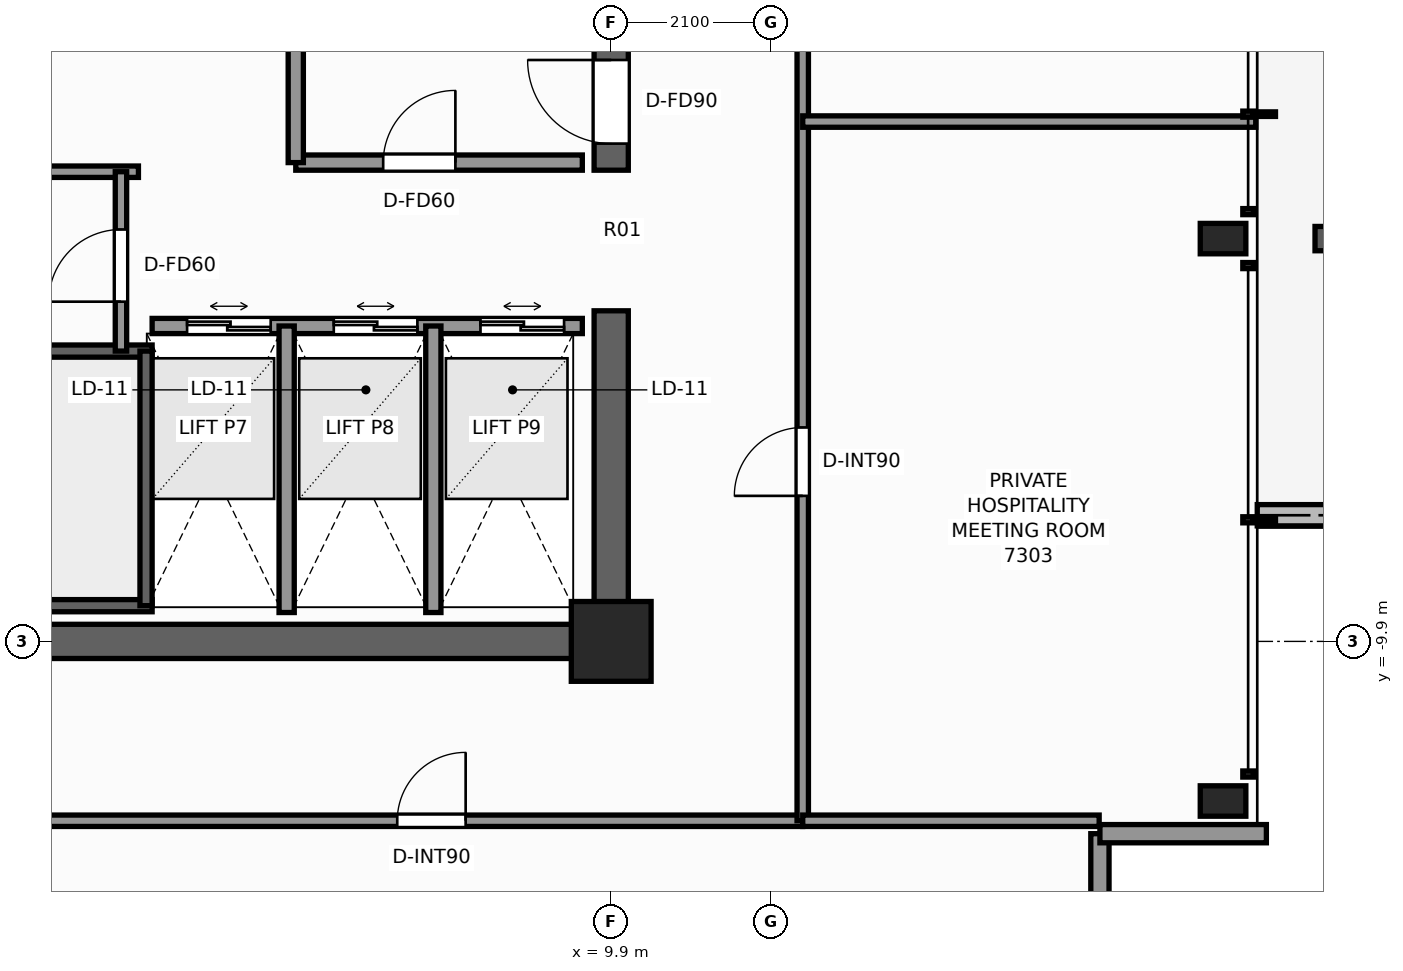
"""IFC4 building model, lengths in metres.
Left out: names, types, materials, properties, quantities, classifications, styles, units other than length and angle.
Written with IfcOpenShell. Run it as: python <this file> out.ifc"""

import sys

from ifc_helpers import new_model, si_unit, direction, frame, frame_2d, origin, origin_2d, place, context, subcontext, project, spatial, rectangle, extrude, element, fill, save


model = new_model("IFC4")
c1 = context("Model", 3, precision=1e-05, world=origin(), true_north=direction((0.0, 1.0)))
c2 = subcontext(c1, "Body", "Model", "MODEL_VIEW")
j1 = project(units=[si_unit("LENGTHUNIT", "METRE"), si_unit("PLANEANGLEUNIT", "RADIAN")], contexts=[c1])
p1 = place(None, origin())
s1 = spatial("IfcSite", under=j1, at=p1, CompositionType="ELEMENT")
p2 = place(p1, origin())
s2 = spatial("IfcBuilding", under=s1, at=p2, CompositionType="ELEMENT")
p3 = place(p2, frame((0.0, 0.0, 251.4)))
s3 = spatial("IfcBuildingStorey", under=s2, at=p3, CompositionType="ELEMENT", Elevation=251.4)
p4 = place(p3, frame((10.125, -9.9, 0.0), z_axis=(0.0, 0.0, 1.0), x_axis=(-1.0, 0.0, 0.0)))
e1 = element("IfcWall", 1, at=p4, inside=s3, PredefinedType="SHEAR", context=c2, shape_type="SweptSolid", body=[
    extrude(rectangle(XDim=11.985, YDim=0.45, at=frame_2d((5.993, 0.0))), origin(), (0.0, 0.0, 1.0), 3.5),
])
p5 = place(p3, frame((9.9, -9.675, 0.0), z_axis=(0.0, 0.0, 1.0), x_axis=(0.0, 1.0, 0.0)))
e2 = element("IfcWall", 2, at=p5, inside=s3, PredefinedType="SHEAR", context=c2, shape_type="SweptSolid", body=[
    extrude(rectangle(XDim=4.125, YDim=0.45, at=frame_2d((2.062, 0.0))), origin(), (0.0, 0.0, 1.0), 3.5),
])
p6 = place(p3, frame((9.9, -3.7, 0.0), z_axis=(0.0, 0.0, 1.0), x_axis=(0.0, 1.0, 0.0)))
e3 = element("IfcWall", 3, at=p6, inside=s3, PredefinedType="SHEAR", context=c2, shape_type="SweptSolid", body=[
    extrude(rectangle(XDim=13.375, YDim=0.45, at=frame_2d((6.688, 0.0))), origin(), (0.0, 0.0, 1.0), 3.5),
])
p7 = place(p6, frame((0.35, 0.0, 0.0)))
e4 = element("IfcOpeningElement", 4, at=p7, cuts=e3, PredefinedType="OPENING", context=c2, shape_type="SweptSolid", body=[
    extrude(rectangle(XDim=1.1, YDim=2.2, at=frame_2d((0.55, 1.1))), frame((0.0, 0.235, 0.0), z_axis=(0.0, -1.0, 0.0), x_axis=(1.0, 0.0, 0.0)), (0.0, 0.0, 1.0), 0.47),
])
p8 = place(p3, frame((9.9, -9.9, 0.0), z_axis=(0.0, 0.0, 1.0), x_axis=(1.0, 0.0, 0.0)))
e5 = element("IfcColumn", 5, at=p8, inside=s3, PredefinedType="COLUMN", context=c2, shape_type="SweptSolid", body=[
    extrude(rectangle(XDim=1.05, YDim=1.05, at=origin_2d()), origin(), (0.0, 0.0, 1.0), 3.5),
])
for number, where, z_axis, x_axis in (
    (6, (17.95, -12.0, 0.0), (0.0, 0.0, 1.0), (1.0, 0.0, 0.0)),
    (7, (17.95, -4.6, 0.0), (0.0, 0.0, 1.0), (1.0, 0.0, 0.0)),
):
    element("IfcColumn", number, at=place(p3, frame(where, z_axis=z_axis, x_axis=x_axis)), inside=s3, PredefinedType="COLUMN", context=c2, shape_type="SweptSolid", body=[
        extrude(rectangle(XDim=0.6, YDim=0.4, at=origin_2d()), origin(), (0.0, 0.0, 1.0), 3.5),
    ])
p9 = place(p3, frame((18.4, -8.24, -0.07), z_axis=(0.0, 0.0, 1.0), x_axis=(1.0, 0.0, 0.0)))
e8 = element("IfcWall", 8, at=p9, inside=s3, PredefinedType="PARAPET", context=c2, shape_type="SweptSolid", body=[
    extrude(rectangle(XDim=2.975, YDim=0.28, at=frame_2d((1.487, 0.0))), origin(), (0.0, 0.0, 1.0), 0.42),
])
p10 = place(p3, frame((16.33, -12.43, 0.0), z_axis=(0.0, 0.0, 1.0), x_axis=(0.0, -1.0, 0.0)))
e9 = element("IfcWall", 9, at=p10, inside=s3, PredefinedType="STANDARD", context=c2, shape_type="SweptSolid", body=[
    extrude(rectangle(XDim=2.19, YDim=0.24, at=frame_2d((1.095, 0.0))), origin(), (0.0, 0.0, 1.0), 2.633),
])
p11 = place(p3, frame((18.52, -12.43, 0.0), z_axis=(0.0, 0.0, 1.0), x_axis=(-1.0, 0.0, 0.0)))
e10 = element("IfcWall", 10, at=p11, inside=s3, PredefinedType="STANDARD", context=c2, shape_type="SweptSolid", body=[
    extrude(rectangle(XDim=2.19, YDim=0.24, at=frame_2d((1.095, 0.0))), origin(), (0.0, 0.0, 1.0), 2.633),
])
p12 = place(p3, frame((3.86, -9.43, 0.0), z_axis=(0.0, 0.0, 1.0), x_axis=(-1.0, 0.0, 0.0)))
e11 = element("IfcWall", 11, at=p12, inside=s3, PredefinedType="SHEAR", context=c2, shape_type="SweptSolid", body=[
    extrude(rectangle(XDim=7.72, YDim=0.16, at=frame_2d((3.86, 0.0))), origin(), (0.0, 0.0, 1.0), 3.5),
])
p13 = place(p12, frame((6.01, 0.0, 0.0)))
e12 = element("IfcOpeningElement", 12, at=p13, cuts=e11, PredefinedType="OPENING", context=c2, shape_type="SweptSolid", body=[
    extrude(rectangle(XDim=1.1, YDim=2.2, at=frame_2d((0.55, 1.1))), frame((0.0, 0.09, 0.0), z_axis=(0.0, -1.0, 0.0), x_axis=(1.0, 0.0, 0.0)), (0.0, 0.0, 1.0), 0.18),
])
p14 = place(p3, frame((-3.86, -6.08, 0.0), z_axis=(0.0, 0.0, 1.0), x_axis=(1.0, 0.0, 0.0)))
e13 = element("IfcWall", 13, at=p14, inside=s3, PredefinedType="SHEAR", context=c2, shape_type="SweptSolid", body=[
    extrude(rectangle(XDim=7.72, YDim=0.16, at=frame_2d((3.86, 0.0))), origin(), (0.0, 0.0, 1.0), 3.5),
])
p15 = place(p3, frame((3.78, -9.43, 0.0), z_axis=(0.0, 0.0, 1.0), x_axis=(0.0, 1.0, 0.0)))
e14 = element("IfcWall", 14, at=p15, inside=s3, PredefinedType="SHEAR", context=c2, shape_type="SweptSolid", body=[
    extrude(rectangle(XDim=3.35, YDim=0.16, at=frame_2d((1.675, 0.0))), origin(), (0.0, 0.0, 1.0), 3.5),
])
p16 = place(p3, frame((5.75, -3.6, 0.0), z_axis=(0.0, 0.0, 1.0), x_axis=(1.0, 0.0, 0.0)))
e15 = element("IfcWall", 15, at=p16, inside=s3, PredefinedType="SOLIDWALL", context=c2, shape_type="SweptSolid", body=[
    extrude(rectangle(XDim=3.77, YDim=0.2, at=frame_2d((1.885, 0.0))), origin(), (0.0, 0.0, 1.0), 3.25),
])
p17 = place(p16, frame((1.15, 0.0, 0.0)))
e16 = element("IfcOpeningElement", 16, at=p17, cuts=e15, PredefinedType="OPENING", context=c2, shape_type="SweptSolid", body=[
    extrude(rectangle(XDim=0.95, YDim=2.06, at=frame_2d((0.475, 1.03))), frame((0.0, 0.11, 0.0), z_axis=(0.0, -1.0, 0.0), x_axis=(1.0, 0.0, 0.0)), (0.0, 0.0, 1.0), 0.22),
])
p18 = place(p3, frame((5.75, -3.6, 0.0), z_axis=(0.0, 0.0, 1.0), x_axis=(0.0, 1.0, 0.0)))
e17 = element("IfcWall", 17, at=p18, inside=s3, PredefinedType="SOLIDWALL", context=c2, shape_type="SweptSolid", body=[
    extrude(rectangle(XDim=5.57, YDim=0.2, at=frame_2d((2.785, 0.0))), origin(), (0.0, 0.0, 1.0), 3.25),
])
p19 = place(p18, frame((2.75, 0.0, 0.0)))
e18 = element("IfcOpeningElement", 18, at=p19, cuts=e17, PredefinedType="OPENING", context=c2, shape_type="SweptSolid", body=[
    extrude(rectangle(XDim=1.1, YDim=2.2, at=frame_2d((0.55, 1.1))), frame((0.0, 0.11, 0.0), z_axis=(0.0, -1.0, 0.0), x_axis=(1.0, 0.0, 0.0)), (0.0, 0.0, 1.0), 0.22),
])
p20 = place(p3, frame((3.86, -5.75, 0.0), z_axis=(0.0, 0.0, 1.0), x_axis=(1.0, 0.0, 0.0)))
e19 = element("IfcWall", 19, at=p20, inside=s3, PredefinedType="SOLIDWALL", context=c2, shape_type="SweptSolid", body=[
    extrude(rectangle(XDim=5.66, YDim=0.2, at=frame_2d((2.83, 0.0))), origin(), (0.0, 0.0, 1.0), 3.25),
])
p21 = place(p20, frame((0.46, 0.0, 0.0)))
e20 = element("IfcOpeningElement", 20, at=p21, cuts=e19, PredefinedType="OPENING", context=c2, shape_type="SweptSolid", body=[
    extrude(rectangle(XDim=1.1, YDim=2.2, at=frame_2d((0.55, 1.1))), frame((0.0, 0.11, 0.0), z_axis=(0.0, -1.0, 0.0), x_axis=(1.0, 0.0, 0.0)), (0.0, 0.0, 1.0), 0.22),
])
p22 = place(p20, frame((2.39, 0.0, 0.0)))
e21 = element("IfcOpeningElement", 21, at=p22, cuts=e19, PredefinedType="OPENING", context=c2, shape_type="SweptSolid", body=[
    extrude(rectangle(XDim=1.1, YDim=2.2, at=frame_2d((0.55, 1.1))), frame((0.0, 0.11, 0.0), z_axis=(0.0, -1.0, 0.0), x_axis=(1.0, 0.0, 0.0)), (0.0, 0.0, 1.0), 0.22),
])
p23 = place(p20, frame((4.32, 0.0, 0.0)))
e22 = element("IfcOpeningElement", 22, at=p23, cuts=e19, PredefinedType="OPENING", context=c2, shape_type="SweptSolid", body=[
    extrude(rectangle(XDim=1.1, YDim=2.2, at=frame_2d((0.55, 1.1))), frame((0.0, 0.11, 0.0), z_axis=(0.0, -1.0, 0.0), x_axis=(1.0, 0.0, 0.0)), (0.0, 0.0, 1.0), 0.22),
])
for number, where, z_axis, x_axis in (
    (23, (5.63, -9.52, 0.0), (0.0, 0.0, 1.0), (0.0, 1.0, 0.0)),
    (24, (7.56, -9.52, 0.0), (0.0, 0.0, 1.0), (0.0, 1.0, 0.0)),
):
    element("IfcWall", number, at=place(p3, frame(where, z_axis=z_axis, x_axis=x_axis)), inside=s3, PredefinedType="SOLIDWALL", context=c2, shape_type="SweptSolid", body=[
        extrude(rectangle(XDim=3.77, YDim=0.2, at=frame_2d((1.885, 0.0))), origin(), (0.0, 0.0, 1.0), 3.25),
    ])
p24 = place(p3, frame((-3.68, -3.72, 0.0), z_axis=(0.0, 0.0, 1.0), x_axis=(1.0, 0.0, 0.0)))
e25 = element("IfcWall", 25, at=p24, inside=s3, PredefinedType="PARTITIONING", context=c2, shape_type="SweptSolid", body=[
    extrude(rectangle(XDim=7.36, YDim=0.15, at=frame_2d((3.68, 0.0))), origin(), (0.0, 0.0, 1.0), 3.25),
])
p25 = place(p3, frame((3.45, -6.08, 0.0), z_axis=(0.0, 0.0, 1.0), x_axis=(0.0, 1.0, 0.0)))
e26 = element("IfcWall", 26, at=p25, inside=s3, PredefinedType="PARTITIONING", context=c2, shape_type="SweptSolid", body=[
    extrude(rectangle(XDim=2.36, YDim=0.15, at=frame_2d((1.18, 0.0))), origin(), (0.0, 0.0, 1.0), 3.25),
])
p26 = place(p25, frame((0.65, 0.0, 0.0)))
e27 = element("IfcOpeningElement", 27, at=p26, cuts=e26, PredefinedType="OPENING", context=c2, shape_type="SweptSolid", body=[
    extrude(rectangle(XDim=0.95, YDim=2.06, at=frame_2d((0.475, 1.03))), frame((0.0, 0.085, 0.0), z_axis=(0.0, -1.0, 0.0), x_axis=(1.0, 0.0, 0.0)), (0.0, 0.0, 1.0), 0.17),
])
p27 = place(p3, frame((-12.26, -12.26, 0.0), z_axis=(0.0, 0.0, 1.0), x_axis=(1.0, 0.0, 0.0)))
e28 = element("IfcWall", 28, at=p27, inside=s3, PredefinedType="PARTITIONING", context=c2, shape_type="SweptSolid", body=[
    extrude(rectangle(XDim=24.68, YDim=0.15, at=frame_2d((12.34, 0.0))), origin(), (0.0, 0.0, 1.0), 2.539),
])
p28 = place(p27, frame((4.216, 0.0, 0.0)))
e29 = element("IfcOpeningElement", 29, at=p28, cuts=e28, PredefinedType="OPENING", context=c2, shape_type="SweptSolid", body=[
    extrude(rectangle(XDim=0.9, YDim=2.06, at=frame_2d((0.45, 1.03))), frame((0.0, 0.085, 0.0), z_axis=(0.0, -1.0, 0.0), x_axis=(1.0, 0.0, 0.0)), (0.0, 0.0, 1.0), 0.17),
])
p29 = place(p27, frame((8.796, 0.0, 0.0)))
e30 = element("IfcOpeningElement", 30, at=p29, cuts=e28, PredefinedType="OPENING", context=c2, shape_type="SweptSolid", body=[
    extrude(rectangle(XDim=0.9, YDim=2.06, at=frame_2d((0.45, 1.03))), frame((0.0, 0.085, 0.0), z_axis=(0.0, -1.0, 0.0), x_axis=(1.0, 0.0, 0.0)), (0.0, 0.0, 1.0), 0.17),
])
p30 = place(p27, frame((12.922, 0.0, 0.0)))
e31 = element("IfcOpeningElement", 31, at=p30, cuts=e28, PredefinedType="OPENING", context=c2, shape_type="SweptSolid", body=[
    extrude(rectangle(XDim=0.95, YDim=2.06, at=frame_2d((0.475, 1.03))), frame((0.0, 0.085, 0.0), z_axis=(0.0, -1.0, 0.0), x_axis=(1.0, 0.0, 0.0)), (0.0, 0.0, 1.0), 0.17),
])
p31 = place(p27, frame((19.345, 0.0, 0.0)))
e32 = element("IfcOpeningElement", 32, at=p31, cuts=e28, PredefinedType="OPENING", context=c2, shape_type="SweptSolid", body=[
    extrude(rectangle(XDim=0.9, YDim=2.06, at=frame_2d((0.45, 1.03))), frame((0.0, 0.085, 0.0), z_axis=(0.0, -1.0, 0.0), x_axis=(1.0, 0.0, 0.0)), (0.0, 0.0, 1.0), 0.17),
])
p32 = place(p3, frame((12.42, -12.26, 0.0), z_axis=(0.0, 0.0, 1.0), x_axis=(0.0, 1.0, 0.0)))
e33 = element("IfcWall", 33, at=p32, inside=s3, PredefinedType="PARTITIONING", context=c2, shape_type="SweptSolid", body=[
    extrude(rectangle(XDim=24.84, YDim=0.15, at=frame_2d((12.42, 0.0))), origin(), (0.0, 0.0, 1.0), 2.539),
])
p33 = place(p32, frame((4.275, 0.0, 0.0)))
e34 = element("IfcOpeningElement", 34, at=p33, cuts=e33, PredefinedType="OPENING", context=c2, shape_type="SweptSolid", body=[
    extrude(rectangle(XDim=0.9, YDim=2.06, at=frame_2d((0.45, 1.03))), frame((0.0, 0.085, 0.0), z_axis=(0.0, -1.0, 0.0), x_axis=(1.0, 0.0, 0.0)), (0.0, 0.0, 1.0), 0.17),
])
p34 = place(p32, frame((19.345, 0.0, 0.0)))
e35 = element("IfcOpeningElement", 35, at=p34, cuts=e33, PredefinedType="OPENING", context=c2, shape_type="SweptSolid", body=[
    extrude(rectangle(XDim=0.9, YDim=2.06, at=frame_2d((0.45, 1.03))), frame((0.0, 0.085, 0.0), z_axis=(0.0, -1.0, 0.0), x_axis=(1.0, 0.0, 0.0)), (0.0, 0.0, 1.0), 0.17),
])
p35 = place(p3, frame((12.42, -12.26, 0.0), z_axis=(0.0, 0.0, 1.0), x_axis=(1.0, 0.0, 0.0)))
e36 = element("IfcWall", 36, at=p35, inside=s3, PredefinedType="PARTITIONING", context=c2, shape_type="SweptSolid", body=[
    extrude(rectangle(XDim=3.9, YDim=0.15, at=frame_2d((1.95, 0.0))), origin(), (0.0, 0.0, 1.0), 3.25),
])
p36 = place(p3, frame((12.42, -3.06, 0.0), z_axis=(0.0, 0.0, 1.0), x_axis=(1.0, 0.0, 0.0)))
e37 = element("IfcWall", 37, at=p36, inside=s3, PredefinedType="PARTITIONING", context=c2, shape_type="SweptSolid", body=[
    extrude(rectangle(XDim=5.96, YDim=0.15, at=frame_2d((2.98, 0.0))), origin(), (0.0, 0.0, 1.0), 2.623),
])
p37 = place(p7, origin())
e38 = element("IfcDoor", 38, at=p37, inside=s3, OperationType="SINGLE_SWING_RIGHT", PredefinedType="DOOR", context=c2, shape_type="SweptSolid", body=[
    extrude(rectangle(XDim=1.1, YDim=2.2, at=frame_2d((0.55, 1.1))), frame((0.0, 0.025, 0.0), z_axis=(0.0, -1.0, 0.0), x_axis=(1.0, 0.0, 0.0)), (0.0, 0.0, 1.0), 0.05),
])
fill(e4, e38)
p38 = place(p21, origin())
e39 = element("IfcDoor", 39, at=p38, inside=s3, OperationType="DOUBLE_DOOR_SLIDING", PredefinedType="DOOR", context=c2, shape_type="SweptSolid", body=[
    extrude(rectangle(XDim=1.1, YDim=2.2, at=frame_2d((0.55, 1.1))), frame((0.0, 0.025, 0.0), z_axis=(0.0, -1.0, 0.0), x_axis=(1.0, 0.0, 0.0)), (0.0, 0.0, 1.0), 0.05),
])
fill(e20, e39)
p39 = place(p22, origin())
e40 = element("IfcDoor", 40, at=p39, inside=s3, OperationType="DOUBLE_DOOR_SLIDING", PredefinedType="DOOR", context=c2, shape_type="SweptSolid", body=[
    extrude(rectangle(XDim=1.1, YDim=2.2, at=frame_2d((0.55, 1.1))), frame((0.0, 0.025, 0.0), z_axis=(0.0, -1.0, 0.0), x_axis=(1.0, 0.0, 0.0)), (0.0, 0.0, 1.0), 0.05),
])
fill(e21, e40)
p40 = place(p23, origin())
e41 = element("IfcDoor", 41, at=p40, inside=s3, OperationType="DOUBLE_DOOR_SLIDING", PredefinedType="DOOR", context=c2, shape_type="SweptSolid", body=[
    extrude(rectangle(XDim=1.1, YDim=2.2, at=frame_2d((0.55, 1.1))), frame((0.0, 0.025, 0.0), z_axis=(0.0, -1.0, 0.0), x_axis=(1.0, 0.0, 0.0)), (0.0, 0.0, 1.0), 0.05),
])
fill(e22, e41)
p41 = place(p17, origin())
e42 = element("IfcDoor", 42, at=p41, inside=s3, OperationType="SINGLE_SWING_RIGHT", PredefinedType="DOOR", context=c2, shape_type="SweptSolid", body=[
    extrude(rectangle(XDim=0.95, YDim=2.06, at=frame_2d((0.475, 1.03))), frame((0.0, 0.025, 0.0), z_axis=(0.0, -1.0, 0.0), x_axis=(1.0, 0.0, 0.0)), (0.0, 0.0, 1.0), 0.05),
])
fill(e16, e42)
p42 = place(p26, origin())
e43 = element("IfcDoor", 43, at=p42, inside=s3, OperationType="SINGLE_SWING_LEFT", PredefinedType="DOOR", context=c2, shape_type="SweptSolid", body=[
    extrude(rectangle(XDim=0.95, YDim=2.06, at=frame_2d((0.475, 1.03))), frame((0.0, 0.025, 0.0), z_axis=(0.0, -1.0, 0.0), x_axis=(1.0, 0.0, 0.0)), (0.0, 0.0, 1.0), 0.05),
])
fill(e27, e43)
p43 = place(p31, origin())
e44 = element("IfcDoor", 44, at=p43, inside=s3, OperationType="SINGLE_SWING_RIGHT", PredefinedType="DOOR", context=c2, shape_type="SweptSolid", body=[
    extrude(rectangle(XDim=0.9, YDim=2.06, at=frame_2d((0.45, 1.03))), frame((0.0, 0.025, 0.0), z_axis=(0.0, -1.0, 0.0), x_axis=(1.0, 0.0, 0.0)), (0.0, 0.0, 1.0), 0.05),
])
fill(e32, e44)
p44 = place(p33, origin())
e45 = element("IfcDoor", 45, at=p44, inside=s3, OperationType="SINGLE_SWING_LEFT", PredefinedType="DOOR", context=c2, shape_type="SweptSolid", body=[
    extrude(rectangle(XDim=0.9, YDim=2.06, at=frame_2d((0.45, 1.03))), frame((0.0, 0.025, 0.0), z_axis=(0.0, -1.0, 0.0), x_axis=(1.0, 0.0, 0.0)), (0.0, 0.0, 1.0), 0.05),
])
fill(e34, e45)
save(model, sys.argv[1])
